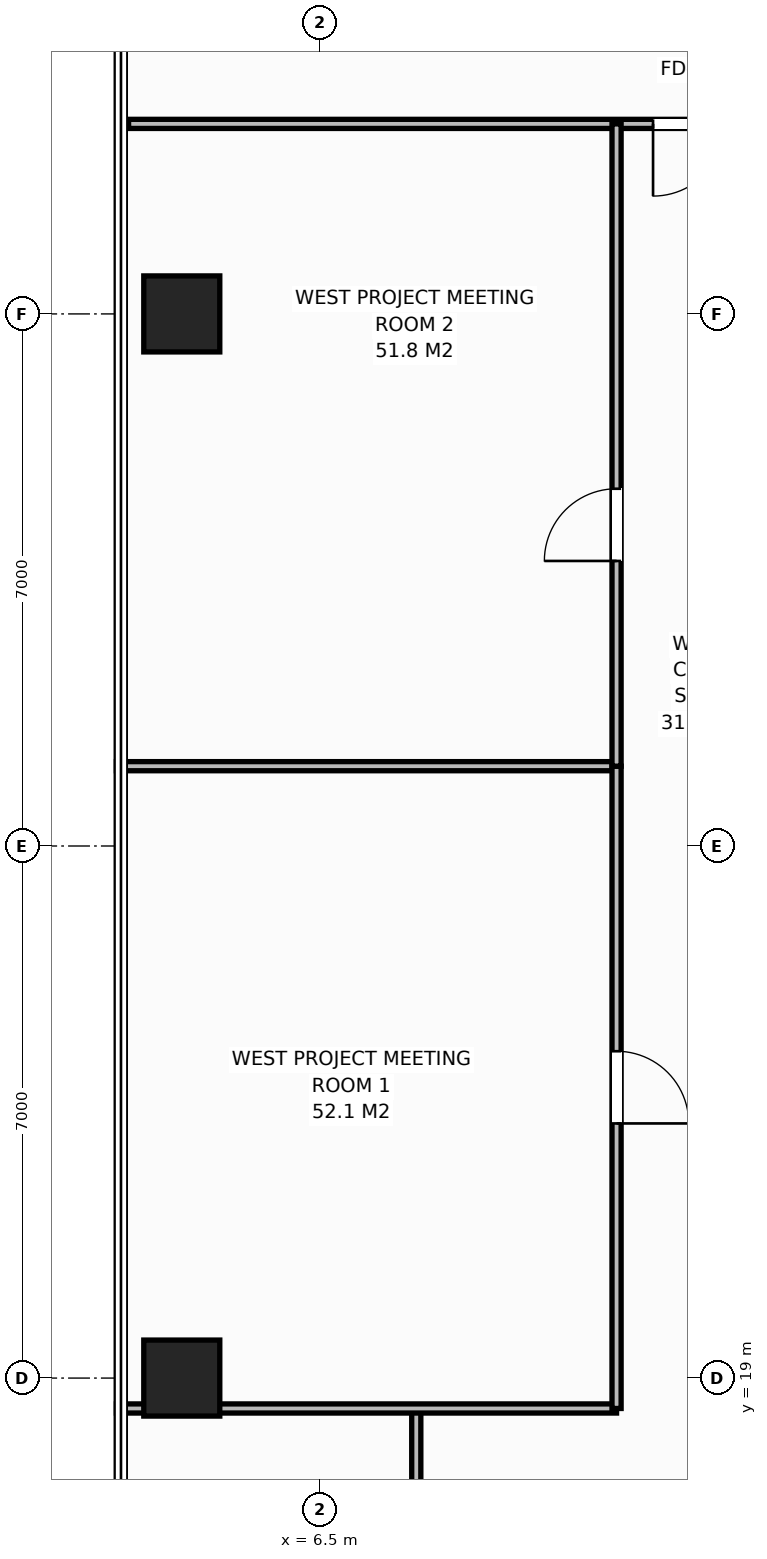
"""IFC4 building model, lengths in metres.
Left out: names, types, materials, properties, quantities, classifications, styles, units other than length and angle.
Written with IfcOpenShell. Run it as: python <this file> out.ifc"""

import sys

from ifc_helpers import new_model, si_unit, direction, frame, frame_2d, origin, origin_2d, place, context, subcontext, project, spatial, rectangle, extrude, element, fill, save


model = new_model("IFC4")
c1 = context("Model", 3, precision=1e-05, world=origin(), true_north=direction((0.0, 1.0)))
c2 = subcontext(c1, "Body", "Model", "MODEL_VIEW")
j1 = project(units=[si_unit("LENGTHUNIT", "METRE"), si_unit("PLANEANGLEUNIT", "RADIAN")], contexts=[c1])
p1 = place(None, origin())
s1 = spatial("IfcSite", under=j1, at=p1, CompositionType="ELEMENT")
p2 = place(p1, origin())
s2 = spatial("IfcBuilding", under=s1, at=p2, CompositionType="ELEMENT")
p3 = place(p2, frame((0.0, 0.0, 174.6)))
s3 = spatial("IfcBuildingStorey", under=s2, at=p3, CompositionType="ELEMENT", Elevation=174.6)
for number, where, z_axis, x_axis in (
    (1, (4.68, 19.0, 0.0), (0.0, 0.0, 1.0), (1.0, 0.0, 0.0)),
    (2, (4.68, 33.0, 0.0), (0.0, 0.0, 1.0), (1.0, 0.0, 0.0)),
):
    element("IfcColumn", number, at=place(p3, frame(where, z_axis=z_axis, x_axis=x_axis)), inside=s3, PredefinedType="COLUMN", context=c2, shape_type="SweptSolid", body=[
        extrude(rectangle(XDim=1.0, YDim=1.0, at=origin_2d()), origin(), (0.0, 0.0, 1.0), 3.8),
    ])
p4 = place(p3, frame((7.765, 16.5, 0.0), z_axis=(0.0, 0.0, 1.0), x_axis=(0.0, 1.0, 0.0)))
e3 = element("IfcWall", 3, at=p4, inside=s3, PredefinedType="PARTITIONING", context=c2, shape_type="SweptSolid", body=[
    extrude(rectangle(XDim=2.1, YDim=0.12, at=frame_2d((1.05, 0.0))), origin(), (0.0, 0.0, 1.0), 3.572),
])
p5 = place(p3, frame((3.98, 35.5, 0.0), z_axis=(0.0, 0.0, 1.0), x_axis=(1.0, 0.0, 0.0)))
e4 = element("IfcWall", 4, at=p5, inside=s3, PredefinedType="PARTITIONING", context=c2, shape_type="SweptSolid", body=[
    extrude(rectangle(XDim=9.62, YDim=0.12, at=frame_2d((4.81, 0.0))), origin(), (0.0, 0.0, 1.0), 3.572),
])
p6 = place(p5, frame((6.9, 0.0, 0.0)))
e5 = element("IfcOpeningElement", 5, at=p6, cuts=e4, PredefinedType="OPENING", context=c2, shape_type="SweptSolid", body=[
    extrude(rectangle(XDim=0.95, YDim=2.15, at=frame_2d((0.475, 1.075))), frame((0.0, 0.07, 0.0), z_axis=(0.0, -1.0, 0.0), x_axis=(1.0, 0.0, 0.0)), (0.0, 0.0, 1.0), 0.14),
])
for number, where, z_axis, x_axis in (
    (6, (3.82, 18.6, 0.0), (0.0, 0.0, 1.0), (1.0, 0.0, 0.0)),
    (7, (3.82, 27.05, 0.0), (0.0, 0.0, 1.0), (1.0, 0.0, 0.0)),
):
    element("IfcWall", number, at=place(p3, frame(where, z_axis=z_axis, x_axis=x_axis)), inside=s3, PredefinedType="PARTITIONING", context=c2, shape_type="SweptSolid", body=[
        extrude(rectangle(XDim=6.58, YDim=0.12, at=frame_2d((3.29, 0.0))), origin(), (0.0, 0.0, 1.0), 3.572),
    ])
p7 = place(p3, frame((10.4, 18.6, 0.0), z_axis=(0.0, 0.0, 1.0), x_axis=(0.0, 1.0, 0.0)))
e8 = element("IfcWall", 8, at=p7, inside=s3, PredefinedType="PARTITIONING", context=c2, shape_type="SweptSolid", body=[
    extrude(rectangle(XDim=8.45, YDim=0.12, at=frame_2d((4.225, 0.0))), origin(), (0.0, 0.0, 1.0), 3.572),
])
p8 = place(p7, frame((3.75, 0.0, 0.0)))
e9 = element("IfcOpeningElement", 9, at=p8, cuts=e8, PredefinedType="OPENING", context=c2, shape_type="SweptSolid", body=[
    extrude(rectangle(XDim=0.95, YDim=2.15, at=frame_2d((0.475, 1.075))), frame((0.0, 0.07, 0.0), z_axis=(0.0, -1.0, 0.0), x_axis=(1.0, 0.0, 0.0)), (0.0, 0.0, 1.0), 0.14),
])
p9 = place(p3, frame((10.4, 27.05, 0.0), z_axis=(0.0, 0.0, 1.0), x_axis=(0.0, 1.0, 0.0)))
e10 = element("IfcWall", 10, at=p9, inside=s3, PredefinedType="PARTITIONING", context=c2, shape_type="SweptSolid", body=[
    extrude(rectangle(XDim=8.45, YDim=0.12, at=frame_2d((4.225, 0.0))), origin(), (0.0, 0.0, 1.0), 3.572),
])
p10 = place(p9, frame((2.7, 0.0, 0.0)))
e11 = element("IfcOpeningElement", 11, at=p10, cuts=e10, PredefinedType="OPENING", context=c2, shape_type="SweptSolid", body=[
    extrude(rectangle(XDim=0.95, YDim=2.15, at=frame_2d((0.475, 1.075))), frame((0.0, 0.07, 0.0), z_axis=(0.0, -1.0, 0.0), x_axis=(1.0, 0.0, 0.0)), (0.0, 0.0, 1.0), 0.14),
])
p11 = place(p6, origin())
e12 = element("IfcDoor", 12, at=p11, inside=s3, OperationType="SINGLE_SWING_RIGHT", PredefinedType="DOOR", context=c2, shape_type="SweptSolid", body=[
    extrude(rectangle(XDim=0.95, YDim=2.15, at=frame_2d((0.475, 1.075))), frame((0.0, 0.025, 0.0), z_axis=(0.0, -1.0, 0.0), x_axis=(1.0, 0.0, 0.0)), (0.0, 0.0, 1.0), 0.05),
])
fill(e5, e12)
p12 = place(p8, origin())
e13 = element("IfcDoor", 13, at=p12, inside=s3, OperationType="SINGLE_SWING_RIGHT", PredefinedType="DOOR", context=c2, shape_type="SweptSolid", body=[
    extrude(rectangle(XDim=0.95, YDim=2.15, at=frame_2d((0.475, 1.075))), frame((0.0, 0.025, 0.0), z_axis=(0.0, -1.0, 0.0), x_axis=(1.0, 0.0, 0.0)), (0.0, 0.0, 1.0), 0.05),
])
fill(e9, e13)
p13 = place(p10, origin())
e14 = element("IfcDoor", 14, at=p13, inside=s3, OperationType="SINGLE_SWING_LEFT", PredefinedType="DOOR", context=c2, shape_type="SweptSolid", body=[
    extrude(rectangle(XDim=0.95, YDim=2.15, at=frame_2d((0.475, 1.075))), frame((0.0, 0.025, 0.0), z_axis=(0.0, -1.0, 0.0), x_axis=(1.0, 0.0, 0.0)), (0.0, 0.0, 1.0), 0.05),
])
fill(e11, e14)
save(model, sys.argv[1])
